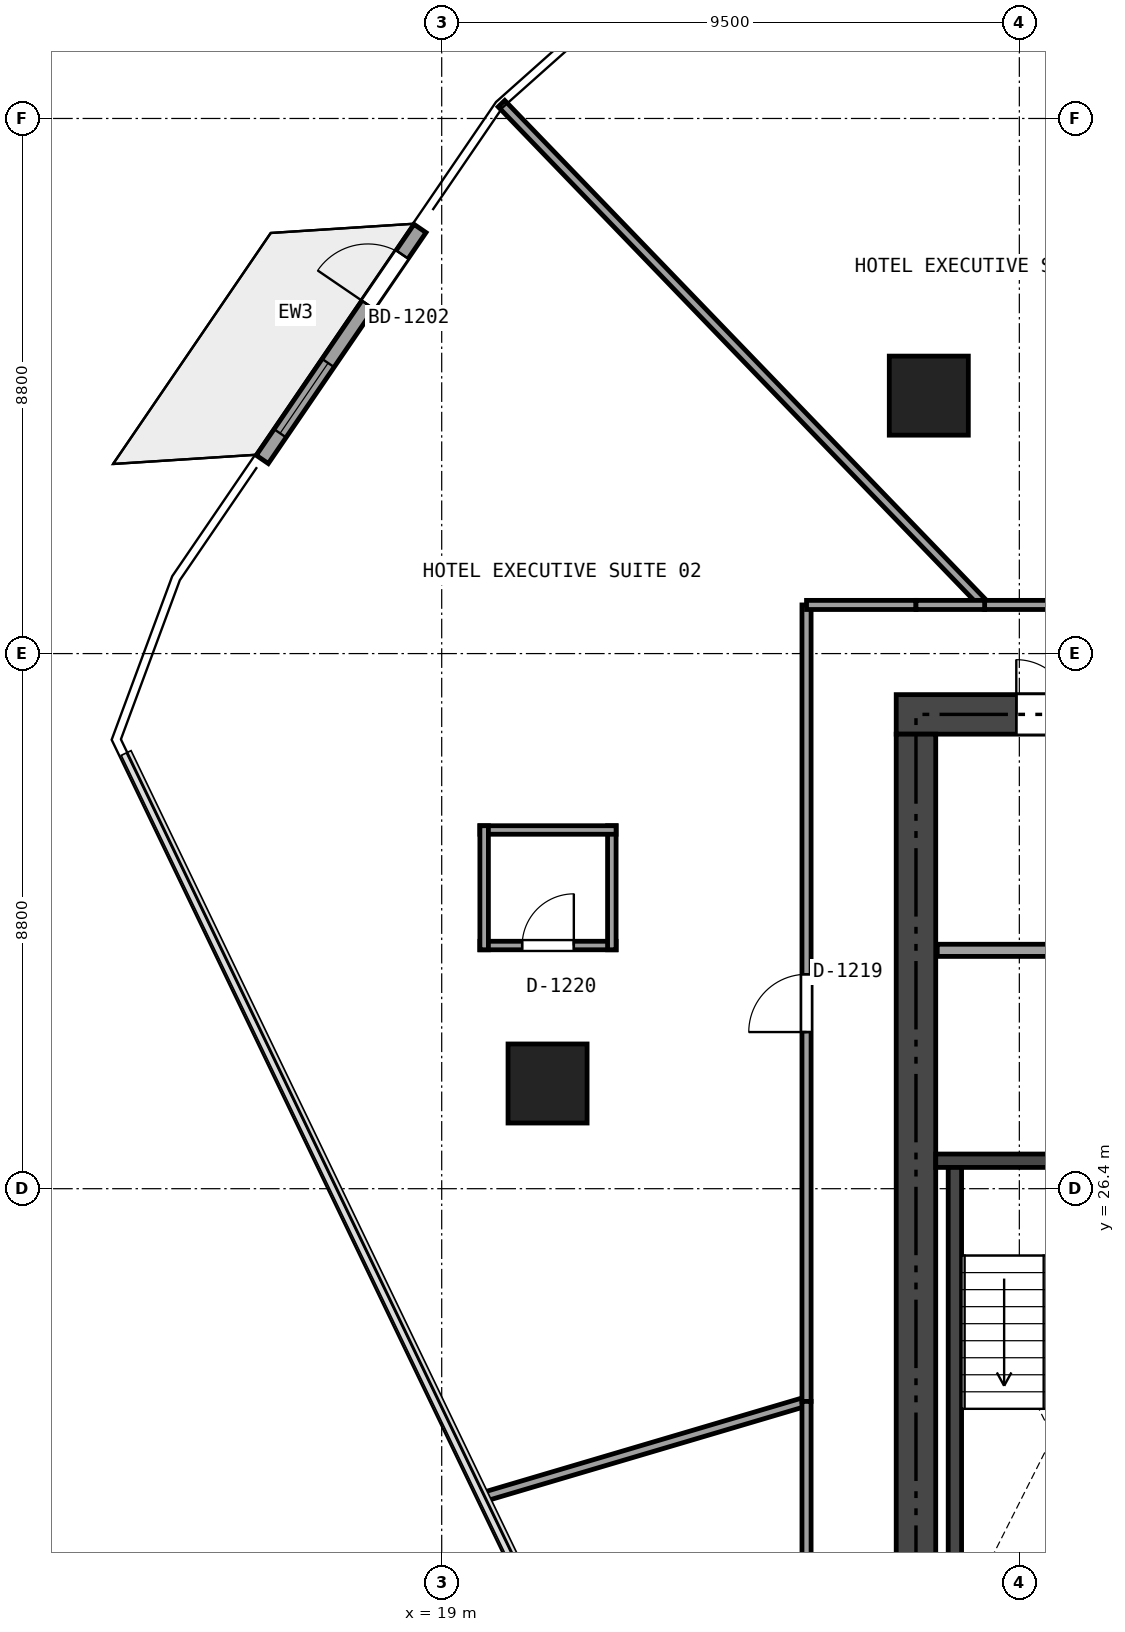
"""IFC4 building model, lengths in metres.
Left out: names, types, materials, properties, quantities, classifications, styles, units other than length and angle.
Written with IfcOpenShell. Run it as: python <this file> out.ifc"""

import sys

from ifc_helpers import new_model, si_unit, direction, frame, frame_2d, origin, origin_2d, place, context, subcontext, project, spatial, rectangle, extrude, element, fill, save


model = new_model("IFC4")
c1 = context("Model", 3, precision=1e-05, world=origin(), true_north=direction((0.0, 1.0)))
c2 = subcontext(c1, "Body", "Model", "MODEL_VIEW")
j1 = project(units=[si_unit("LENGTHUNIT", "METRE"), si_unit("PLANEANGLEUNIT", "RADIAN")], contexts=[c1])
p1 = place(None, origin())
s1 = spatial("IfcSite", under=j1, at=p1, CompositionType="ELEMENT")
p2 = place(p1, origin())
s2 = spatial("IfcBuilding", under=s1, at=p2, CompositionType="ELEMENT")
p3 = place(p2, frame((0.0, 0.0, 51.15)))
s3 = spatial("IfcBuildingStorey", under=s2, at=p3, CompositionType="ELEMENT", Elevation=51.15)
p4 = place(p3, frame((26.475, 34.2, 0.0), z_axis=(0.0, 0.0, 1.0), x_axis=(1.0, 0.0, 0.0)))
e1 = element("IfcWall", 1, at=p4, inside=s3, PredefinedType="SHEAR", context=c2, shape_type="SweptSolid", body=[
    extrude(rectangle(XDim=21.45, YDim=0.65, at=frame_2d((10.725, 0.0))), origin(), (0.0, 0.0, 1.0), 3.17),
])
p5 = place(p4, frame((9.725, 0.0, 0.0)))
e2 = element("IfcOpeningElement", 2, at=p5, cuts=e1, PredefinedType="OPENING", context=c2, shape_type="SweptSolid", body=[
    extrude(rectangle(XDim=1.1, YDim=2.15, at=frame_2d((0.55, 1.075))), frame((0.0, 0.335, 0.0), z_axis=(0.0, -1.0, 0.0), x_axis=(1.0, 0.0, 0.0)), (0.0, 0.0, 1.0), 0.67),
])
p6 = place(p4, frame((1.975, 0.0, 0.0)))
e3 = element("IfcOpeningElement", 3, at=p6, cuts=e1, PredefinedType="OPENING", context=c2, shape_type="SweptSolid", body=[
    extrude(rectangle(XDim=0.9, YDim=2.1, at=frame_2d((0.45, 1.05))), frame((0.0, 0.335, 0.0), z_axis=(0.0, -1.0, 0.0), x_axis=(1.0, 0.0, 0.0)), (0.0, 0.0, 1.0), 0.67),
])
p7 = place(p4, frame((6.275, 0.0, 0.0)))
e4 = element("IfcOpeningElement", 4, at=p7, cuts=e1, PredefinedType="OPENING", context=c2, shape_type="SweptSolid", body=[
    extrude(rectangle(XDim=0.9, YDim=2.1, at=frame_2d((0.45, 1.05))), frame((0.0, 0.335, 0.0), z_axis=(0.0, -1.0, 0.0), x_axis=(1.0, 0.0, 0.0)), (0.0, 0.0, 1.0), 0.67),
])
p8 = place(p3, frame((26.8, 18.925, 0.0), z_axis=(0.0, 0.0, 1.0), x_axis=(0.0, 1.0, 0.0)))
e5 = element("IfcWall", 5, at=p8, inside=s3, PredefinedType="SHEAR", context=c2, shape_type="SweptSolid", body=[
    extrude(rectangle(XDim=14.95, YDim=0.65, at=frame_2d((7.475, 0.0))), origin(), (0.0, 0.0, 1.0), 3.17),
])
p9 = place(p3, frame((27.125, 26.86, 0.0), z_axis=(0.0, 0.0, 1.0), x_axis=(1.0, 0.0, 0.0)))
e6 = element("IfcWall", 6, at=p9, inside=s3, PredefinedType="SHEAR", context=c2, shape_type="SweptSolid", body=[
    extrude(rectangle(XDim=3.425, YDim=0.22, at=frame_2d((1.712, 0.0))), origin(), (0.0, 0.0, 1.0), 3.17),
])
p10 = place(p3, frame((27.44, 19.35, 0.0), z_axis=(0.0, 0.0, 1.0), x_axis=(0.0, 1.0, 0.0)))
e7 = element("IfcWall", 7, at=p10, inside=s3, PredefinedType="SHEAR", context=c2, shape_type="SweptSolid", body=[
    extrude(rectangle(XDim=7.4, YDim=0.22, at=frame_2d((3.7, 0.0))), origin(), (0.0, 0.0, 1.0), 3.17),
])
for number, where, z_axis, x_axis in (
    (8, (27.011, 39.442, 0.0), (0.0, 0.0, 1.0), (1.0, 0.0, 0.0)),
    (9, (20.741, 28.13, 0.0), (0.0, 0.0, 1.0), (1.0, 0.0, 0.0)),
):
    element("IfcColumn", number, at=place(p3, frame(where, z_axis=z_axis, x_axis=x_axis)), inside=s3, PredefinedType="COLUMN", context=c2, shape_type="SweptSolid", body=[
        extrude(rectangle(XDim=1.3, YDim=1.3, at=origin_2d()), origin(), (0.0, 0.0, 1.0), 3.17),
    ])
p11 = place(p3, frame((16.049, 38.393, 0.0), z_axis=(0.0, 0.0, 1.0), x_axis=(0.563913092541, 0.825834138348, 0.0)))
e10 = element("IfcWall", 10, at=p11, inside=s3, PredefinedType="SOLIDWALL", context=c2, shape_type="SweptSolid", body=[
    extrude(rectangle(XDim=4.6, YDim=0.24, at=frame_2d((2.3, 0.0))), origin(), (0.0, 0.0, 1.0), 3.17),
])
p12 = place(p11, frame((3.08, 0.0, 0.0)))
e11 = element("IfcOpeningElement", 11, at=p12, cuts=e10, PredefinedType="OPENING", context=c2, shape_type="SweptSolid", body=[
    extrude(rectangle(XDim=1.0, YDim=2.15, at=frame_2d((0.5, 1.075))), frame((0.0, 0.13, 0.0), z_axis=(0.0, -1.0, 0.0), x_axis=(1.0, 0.0, 0.0)), (0.0, 0.0, 1.0), 0.26),
])
p13 = place(p11, frame((0.52, 0.0, 0.2)))
e12 = element("IfcOpeningElement", 12, at=p13, cuts=e10, PredefinedType="OPENING", context=c2, shape_type="SweptSolid", body=[
    extrude(rectangle(XDim=1.4, YDim=1.95, at=frame_2d((0.7, 0.975))), frame((0.0, 0.13, 0.0), z_axis=(0.0, -1.0, 0.0), x_axis=(1.0, 0.0, 0.0)), (0.0, 0.0, 1.0), 0.26),
])
p14 = place(p3, frame((27.15, 30.32, 0.0), z_axis=(0.0, 0.0, 1.0), x_axis=(1.0, 0.0, 0.0)))
e13 = element("IfcWall", 13, at=p14, inside=s3, PredefinedType="SOLIDWALL", context=c2, shape_type="SweptSolid", body=[
    extrude(rectangle(XDim=3.45, YDim=0.2, at=frame_2d((1.725, 0.0))), origin(), (0.0, 0.0, 1.0), 3.17),
])
p15 = place(p3, frame((19.628, 30.399, 0.0), z_axis=(0.0, 0.0, 1.0), x_axis=(1.0, 0.0, 0.0)))
e14 = element("IfcWall", 14, at=p15, inside=s3, PredefinedType="PARTITIONING", context=c2, shape_type="SweptSolid", body=[
    extrude(rectangle(XDim=2.24, YDim=0.14, at=frame_2d((1.12, 0.0))), origin(), (0.0, 0.0, 1.0), 2.355),
])
p16 = place(p15, frame((0.695, 0.0, 0.0)))
e15 = element("IfcOpeningElement", 15, at=p16, cuts=e14, PredefinedType="OPENING", context=c2, shape_type="SweptSolid", body=[
    extrude(rectangle(XDim=0.85, YDim=2.1, at=frame_2d((0.425, 1.05))), frame((0.0, 0.08, 0.0), z_axis=(0.0, -1.0, 0.0), x_axis=(1.0, 0.0, 0.0)), (0.0, 0.0, 1.0), 0.16),
])
p17 = place(p3, frame((21.798, 30.329, 0.0), z_axis=(0.0, 0.0, 1.0), x_axis=(0.0, 1.0, 0.0)))
e16 = element("IfcWall", 16, at=p17, inside=s3, PredefinedType="PARTITIONING", context=c2, shape_type="SweptSolid", body=[
    extrude(rectangle(XDim=2.04, YDim=0.14, at=frame_2d((1.02, 0.0))), origin(), (0.0, 0.0, 1.0), 2.355),
])
p18 = place(p3, frame((21.868, 32.299, 0.0), z_axis=(0.0, 0.0, 1.0), x_axis=(-1.0, 0.0, 0.0)))
e17 = element("IfcWall", 17, at=p18, inside=s3, PredefinedType="PARTITIONING", context=c2, shape_type="SweptSolid", body=[
    extrude(rectangle(XDim=2.24, YDim=0.14, at=frame_2d((1.12, 0.0))), origin(), (0.0, 0.0, 1.0), 2.691),
])
p19 = place(p3, frame((19.698, 32.369, 0.0), z_axis=(0.0, 0.0, 1.0), x_axis=(0.0, -1.0, 0.0)))
e18 = element("IfcWall", 18, at=p19, inside=s3, PredefinedType="PARTITIONING", context=c2, shape_type="SweptSolid", body=[
    extrude(rectangle(XDim=2.04, YDim=0.14, at=frame_2d((1.02, 0.0))), origin(), (0.0, 0.0, 1.0), 3.17),
])
p20 = place(p3, frame((19.983, 44.244, 0.0), z_axis=(0.0, 0.0, 1.0), x_axis=(0.693980477279, -0.719993817442, 0.0)))
e19 = element("IfcWall", 19, at=p20, inside=s3, PredefinedType="PARTITIONING", context=c2, shape_type="SweptSolid", body=[
    extrude(rectangle(XDim=11.45, YDim=0.15, at=frame_2d((5.725, 0.0))), origin(), (0.0, 0.0, 1.0), 2.355),
])
p21 = place(p3, frame((27.929, 36.0, 0.0), z_axis=(0.0, 0.0, 1.0), x_axis=(1.0, 0.0, 0.0)))
e20 = element("IfcWall", 20, at=p21, inside=s3, PredefinedType="PARTITIONING", context=c2, shape_type="SweptSolid", body=[
    extrude(rectangle(XDim=12.765, YDim=0.15, at=frame_2d((6.383, 0.0))), origin(), (0.0, 0.0, 1.0), 2.395),
])
p22 = place(p21, frame((5.908, 0.0, 0.0)))
e21 = element("IfcOpeningElement", 21, at=p22, cuts=e20, PredefinedType="OPENING", context=c2, shape_type="SweptSolid", body=[
    extrude(rectangle(XDim=0.95, YDim=2.15, at=frame_2d((0.475, 1.075))), frame((0.0, 0.085, 0.0), z_axis=(0.0, -1.0, 0.0), x_axis=(1.0, 0.0, 0.0)), (0.0, 0.0, 1.0), 0.17),
])
p23 = place(p3, frame((19.652, 21.32, 0.0), z_axis=(0.0, 0.0, 1.0), x_axis=(0.958921677743, 0.283670964244, 0.0)))
e22 = element("IfcWall", 22, at=p23, inside=s3, PredefinedType="PARTITIONING", context=c2, shape_type="SweptSolid", body=[
    extrude(rectangle(XDim=5.577, YDim=0.15, at=frame_2d((2.789, 0.0))), origin(), (0.0, 0.0, 1.0), 2.355),
])
p24 = place(p3, frame((25.0, 22.902, 0.0), z_axis=(0.0, 0.0, 1.0), x_axis=(0.0, 1.0, 0.0)))
e23 = element("IfcWall", 23, at=p24, inside=s3, PredefinedType="PARTITIONING", context=c2, shape_type="SweptSolid", body=[
    extrude(rectangle(XDim=13.098, YDim=0.15, at=frame_2d((6.549, 0.0))), origin(), (0.0, 0.0, 1.0), 2.355),
])
p25 = place(p24, frame((6.074, 0.0, 0.0)))
e24 = element("IfcOpeningElement", 24, at=p25, cuts=e23, PredefinedType="OPENING", context=c2, shape_type="SweptSolid", body=[
    extrude(rectangle(XDim=0.95, YDim=2.15, at=frame_2d((0.475, 1.075))), frame((0.0, 0.085, 0.0), z_axis=(0.0, -1.0, 0.0), x_axis=(1.0, 0.0, 0.0)), (0.0, 0.0, 1.0), 0.17),
])
p26 = place(p3, frame((25.0, 36.0, 0.0), z_axis=(0.0, 0.0, 1.0), x_axis=(1.0, 0.0, 0.0)))
e25 = element("IfcWall", 25, at=p26, inside=s3, PredefinedType="PARTITIONING", context=c2, shape_type="SweptSolid", body=[
    extrude(rectangle(XDim=1.8, YDim=0.15, at=frame_2d((0.9, 0.0))), origin(), (0.0, 0.0, 1.0), 2.355),
])
p27 = place(p3, frame((26.8, 36.0, 0.0), z_axis=(0.0, 0.0, 1.0), x_axis=(1.0, 0.0, 0.0)))
e26 = element("IfcWall", 26, at=p27, inside=s3, PredefinedType="PARTITIONING", context=c2, shape_type="SweptSolid", body=[
    extrude(rectangle(XDim=1.129, YDim=0.15, at=frame_2d((0.564, 0.0))), origin(), (0.0, 0.0, 1.0), 3.17),
])
p28 = place(p3, frame((25.0, 18.6, 0.0), z_axis=(0.0, 0.0, 1.0), x_axis=(0.0, 1.0, 0.0)))
e27 = element("IfcWall", 27, at=p28, inside=s3, PredefinedType="PARTITIONING", context=c2, shape_type="SweptSolid", body=[
    extrude(rectangle(XDim=4.302, YDim=0.15, at=frame_2d((2.151, 0.0))), origin(), (0.0, 0.0, 1.0), 2.395),
])
p29 = place(p12, origin())
e28 = element("IfcDoor", 28, at=p29, inside=s3, OperationType="SINGLE_SWING_LEFT", PredefinedType="DOOR", context=c2, shape_type="SweptSolid", body=[
    extrude(rectangle(XDim=1.0, YDim=2.15, at=frame_2d((0.5, 1.075))), frame((0.0, 0.025, 0.0), z_axis=(0.0, -1.0, 0.0), x_axis=(1.0, 0.0, 0.0)), (0.0, 0.0, 1.0), 0.05),
])
fill(e11, e28)
p30 = place(p13, origin())
e29 = element("IfcWindow", 29, at=p30, inside=s3, PartitioningType="SINGLE_PANEL", PredefinedType="WINDOW", context=c2, shape_type="SweptSolid", body=[
    extrude(rectangle(XDim=1.4, YDim=1.95, at=frame_2d((0.7, 0.975))), frame((0.0, 0.03, 0.0), z_axis=(0.0, -1.0, 0.0), x_axis=(1.0, 0.0, 0.0)), (0.0, 0.0, 1.0), 0.06),
])
fill(e12, e29)
p31 = place(p6, origin())
e30 = element("IfcDoor", 30, at=p31, inside=s3, OperationType="SINGLE_SWING_LEFT", PredefinedType="DOOR", context=c2, shape_type="SweptSolid", body=[
    extrude(rectangle(XDim=0.9, YDim=2.1, at=frame_2d((0.45, 1.05))), frame((0.0, 0.025, 0.0), z_axis=(0.0, -1.0, 0.0), x_axis=(1.0, 0.0, 0.0)), (0.0, 0.0, 1.0), 0.05),
])
fill(e3, e30)
p32 = place(p25, origin())
e31 = element("IfcDoor", 31, at=p32, inside=s3, OperationType="SINGLE_SWING_LEFT", PredefinedType="DOOR", context=c2, shape_type="SweptSolid", body=[
    extrude(rectangle(XDim=0.95, YDim=2.15, at=frame_2d((0.475, 1.075))), frame((0.0, 0.025, 0.0), z_axis=(0.0, -1.0, 0.0), x_axis=(1.0, 0.0, 0.0)), (0.0, 0.0, 1.0), 0.05),
])
fill(e24, e31)
p33 = place(p16, origin())
e32 = element("IfcDoor", 32, at=p33, inside=s3, OperationType="SINGLE_SWING_RIGHT", PredefinedType="DOOR", context=c2, shape_type="SweptSolid", body=[
    extrude(rectangle(XDim=0.85, YDim=2.1, at=frame_2d((0.425, 1.05))), frame((0.0, 0.025, 0.0), z_axis=(0.0, -1.0, 0.0), x_axis=(1.0, 0.0, 0.0)), (0.0, 0.0, 1.0), 0.05),
])
fill(e15, e32)
save(model, sys.argv[1])
